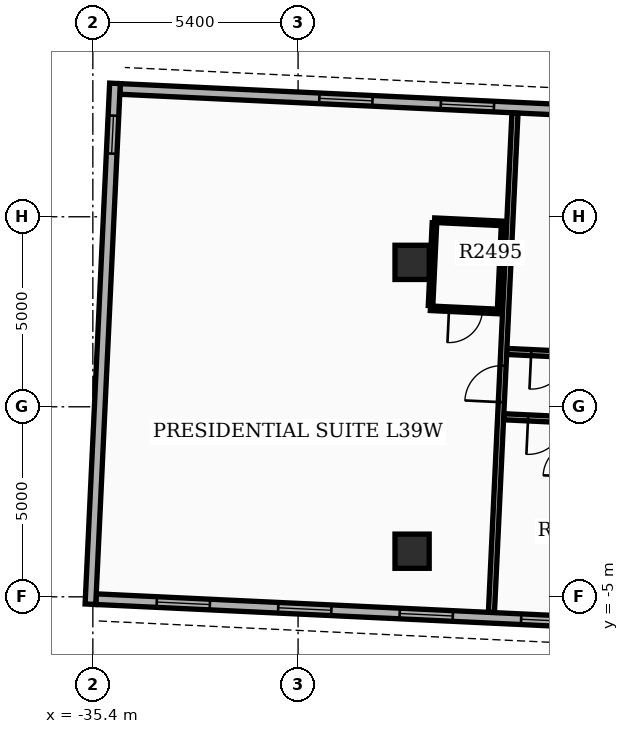
"""IFC4 building model, lengths in metres.
Left out: names, types, materials, properties, quantities, classifications, styles, units other than length and angle.
Written with IfcOpenShell. Run it as: python <this file> out.ifc"""

import sys

from ifc_helpers import new_model, si_unit, direction, frame, frame_2d, origin, origin_2d, place, context, subcontext, project, spatial, rectangle, extrude, element, fill, save


model = new_model("IFC4")
c1 = context("Model", 3, precision=1e-05, world=origin(), true_north=direction((0.0, 1.0)))
c2 = subcontext(c1, "Body", "Model", "MODEL_VIEW")
j1 = project(units=[si_unit("LENGTHUNIT", "METRE"), si_unit("PLANEANGLEUNIT", "RADIAN")], contexts=[c1])
p1 = place(None, origin())
s1 = spatial("IfcSite", under=j1, at=p1, CompositionType="ELEMENT")
p2 = place(p1, origin())
s2 = spatial("IfcBuilding", under=s1, at=p2, CompositionType="ELEMENT")
p3 = place(p2, frame((0.0, 0.0, 156.6)))
s3 = spatial("IfcBuildingStorey", under=s2, at=p3, CompositionType="ELEMENT", Elevation=156.6)
for number, where, z_axis, x_axis in (
    (1, (-27.0, -3.8, 0.0), (0.0, 0.0, 1.0), (1.0, 0.0, 0.0)),
    (2, (-27.0, 3.8, 0.0), (0.0, 0.0, 1.0), (1.0, 0.0, 0.0)),
):
    element("IfcColumn", number, at=place(p3, frame(where, z_axis=z_axis, x_axis=x_axis)), inside=s3, PredefinedType="COLUMN", context=c2, shape_type="SweptSolid", body=[
        extrude(rectangle(XDim=0.9, YDim=0.9, at=origin_2d()), origin(), (0.0, 0.0, 1.0), 3.9),
    ])
p4 = place(p3, frame((-14.607, 7.416, 0.0), z_axis=(0.0, 0.0, 1.0), x_axis=(-0.998890015344, 0.047103473814, 0.0)))
e3 = element("IfcWall", 3, at=p4, inside=s3, PredefinedType="STANDARD", context=c2, shape_type="SweptSolid", body=[
    extrude(rectangle(XDim=20.1, YDim=0.28, at=frame_2d((10.05, 0.0))), origin(), (0.0, 0.0, 1.0), 2.97),
])
p5 = place(p4, frame((1.6, 0.0, 0.8)))
e4 = element("IfcOpeningElement", 4, at=p5, cuts=e3, PredefinedType="OPENING", context=c2, shape_type="SweptSolid", body=[
    extrude(rectangle(XDim=1.4, YDim=1.6, at=frame_2d((0.7, 0.8))), frame((0.0, 0.15, 0.0), z_axis=(0.0, -1.0, 0.0), x_axis=(1.0, 0.0, 0.0)), (0.0, 0.0, 1.0), 0.3),
])
p6 = place(p4, frame((6.55, 0.0, 0.8)))
e5 = element("IfcOpeningElement", 5, at=p6, cuts=e3, PredefinedType="OPENING", context=c2, shape_type="SweptSolid", body=[
    extrude(rectangle(XDim=1.4, YDim=1.6, at=frame_2d((0.7, 0.8))), frame((0.0, 0.15, 0.0), z_axis=(0.0, -1.0, 0.0), x_axis=(1.0, 0.0, 0.0)), (0.0, 0.0, 1.0), 0.3),
])
p7 = place(p4, frame((10.25, 0.0, 0.8)))
e6 = element("IfcOpeningElement", 6, at=p7, cuts=e3, PredefinedType="OPENING", context=c2, shape_type="SweptSolid", body=[
    extrude(rectangle(XDim=1.4, YDim=1.6, at=frame_2d((0.7, 0.8))), frame((0.0, 0.15, 0.0), z_axis=(0.0, -1.0, 0.0), x_axis=(1.0, 0.0, 0.0)), (0.0, 0.0, 1.0), 0.3),
])
p8 = place(p4, frame((13.45, 0.0, 0.8)))
e7 = element("IfcOpeningElement", 7, at=p8, cuts=e3, PredefinedType="OPENING", context=c2, shape_type="SweptSolid", body=[
    extrude(rectangle(XDim=1.4, YDim=1.6, at=frame_2d((0.7, 0.8))), frame((0.0, 0.15, 0.0), z_axis=(0.0, -1.0, 0.0), x_axis=(1.0, 0.0, 0.0)), (0.0, 0.0, 1.0), 0.3),
])
p9 = place(p3, frame((-35.318, -5.062, 0.0), z_axis=(0.0, 0.0, 1.0), x_axis=(0.998890015344, -0.047103473814, 0.0)))
e8 = element("IfcWall", 8, at=p9, inside=s3, PredefinedType="STANDARD", context=c2, shape_type="SweptSolid", body=[
    extrude(rectangle(XDim=20.1, YDim=0.28, at=frame_2d((10.05, 0.0))), origin(), (0.0, 0.0, 1.0), 2.97),
])
p10 = place(p9, frame((1.6, 0.0, 0.8)))
e9 = element("IfcOpeningElement", 9, at=p10, cuts=e8, PredefinedType="OPENING", context=c2, shape_type="SweptSolid", body=[
    extrude(rectangle(XDim=1.4, YDim=1.6, at=frame_2d((0.7, 0.8))), frame((0.0, 0.15, 0.0), z_axis=(0.0, -1.0, 0.0), x_axis=(1.0, 0.0, 0.0)), (0.0, 0.0, 1.0), 0.3),
])
p11 = place(p9, frame((4.8, 0.0, 0.8)))
e10 = element("IfcOpeningElement", 10, at=p11, cuts=e8, PredefinedType="OPENING", context=c2, shape_type="SweptSolid", body=[
    extrude(rectangle(XDim=1.4, YDim=1.6, at=frame_2d((0.7, 0.8))), frame((0.0, 0.15, 0.0), z_axis=(0.0, -1.0, 0.0), x_axis=(1.0, 0.0, 0.0)), (0.0, 0.0, 1.0), 0.3),
])
p12 = place(p9, frame((8.0, 0.0, 0.8)))
e11 = element("IfcOpeningElement", 11, at=p12, cuts=e8, PredefinedType="OPENING", context=c2, shape_type="SweptSolid", body=[
    extrude(rectangle(XDim=1.4, YDim=1.6, at=frame_2d((0.7, 0.8))), frame((0.0, 0.15, 0.0), z_axis=(0.0, -1.0, 0.0), x_axis=(1.0, 0.0, 0.0)), (0.0, 0.0, 1.0), 0.3),
])
p13 = place(p9, frame((11.2, 0.0, 0.8)))
e12 = element("IfcOpeningElement", 12, at=p13, cuts=e8, PredefinedType="OPENING", context=c2, shape_type="SweptSolid", body=[
    extrude(rectangle(XDim=1.4, YDim=1.6, at=frame_2d((0.7, 0.8))), frame((0.0, 0.15, 0.0), z_axis=(0.0, -1.0, 0.0), x_axis=(1.0, 0.0, 0.0)), (0.0, 0.0, 1.0), 0.3),
])
p14 = place(p9, frame((15.75, 0.0, 0.0)))
e13 = element("IfcOpeningElement", 13, at=p14, cuts=e8, PredefinedType="OPENING", context=c2, shape_type="SweptSolid", body=[
    extrude(rectangle(XDim=0.96, YDim=2.1, at=frame_2d((0.48, 1.05))), frame((0.0, 0.15, 0.0), z_axis=(0.0, -1.0, 0.0), x_axis=(1.0, 0.0, 0.0)), (0.0, 0.0, 1.0), 0.3),
])
p15 = place(p3, frame((-34.818, 8.51, 0.0), z_axis=(0.0, 0.0, 1.0), x_axis=(-0.047101845086, -0.998890092147, 0.0)))
e14 = element("IfcWall", 14, at=p15, inside=s3, PredefinedType="STANDARD", context=c2, shape_type="SweptSolid", body=[
    extrude(rectangle(XDim=13.72, YDim=0.28, at=frame_2d((6.86, 0.0))), origin(), (0.0, 0.0, 1.0), 2.97),
])
p16 = place(p15, frame((0.85, 0.0, 0.85)))
e15 = element("IfcOpeningElement", 15, at=p16, cuts=e14, PredefinedType="OPENING", context=c2, shape_type="SweptSolid", body=[
    extrude(rectangle(XDim=1.0, YDim=1.5, at=frame_2d((0.5, 0.75))), frame((0.0, 0.15, 0.0), z_axis=(0.0, -1.0, 0.0), x_axis=(1.0, 0.0, 0.0)), (0.0, 0.0, 1.0), 0.3),
])
p17 = place(p3, frame((-14.819, 0.999, 0.0), z_axis=(0.0, 0.0, 1.0), x_axis=(-0.998890575268, 0.047091598416, 0.0)))
e16 = element("IfcWall", 16, at=p17, inside=s3, PredefinedType="PARTITIONING", context=c2, shape_type="SweptSolid", body=[
    extrude(rectangle(XDim=9.7, YDim=0.16, at=frame_2d((4.85, 0.0))), origin(), (0.0, 0.0, 1.0), 2.96),
])
p18 = place(p17, frame((2.575, 0.0, 0.0)))
e17 = element("IfcOpeningElement", 17, at=p18, cuts=e16, PredefinedType="OPENING", context=c2, shape_type="SweptSolid", body=[
    extrude(rectangle(XDim=0.96, YDim=2.15, at=frame_2d((0.48, 1.075))), frame((0.0, 0.09, 0.0), z_axis=(0.0, -1.0, 0.0), x_axis=(1.0, 0.0, 0.0)), (0.0, 0.0, 1.0), 0.18),
])
p19 = place(p17, frame((8.097, 0.0, 0.0)))
e18 = element("IfcOpeningElement", 18, at=p19, cuts=e16, PredefinedType="OPENING", context=c2, shape_type="SweptSolid", body=[
    extrude(rectangle(XDim=0.96, YDim=2.15, at=frame_2d((0.48, 1.075))), frame((0.0, 0.09, 0.0), z_axis=(0.0, -1.0, 0.0), x_axis=(1.0, 0.0, 0.0)), (0.0, 0.0, 1.0), 0.18),
])
p20 = place(p3, frame((-14.9, -0.719, 0.0), z_axis=(0.0, 0.0, 1.0), x_axis=(-0.99888939101, 0.047116711769, 0.0)))
e19 = element("IfcWall", 19, at=p20, inside=s3, PredefinedType="PARTITIONING", context=c2, shape_type="SweptSolid", body=[
    extrude(rectangle(XDim=9.7, YDim=0.16, at=frame_2d((4.85, 0.0))), origin(), (0.0, 0.0, 1.0), 2.96),
])
p21 = place(p20, frame((2.575, 0.0, 0.0)))
e20 = element("IfcOpeningElement", 20, at=p21, cuts=e19, PredefinedType="OPENING", context=c2, shape_type="SweptSolid", body=[
    extrude(rectangle(XDim=0.96, YDim=2.15, at=frame_2d((0.48, 1.075))), frame((0.0, 0.09, 0.0), z_axis=(0.0, -1.0, 0.0), x_axis=(1.0, 0.0, 0.0)), (0.0, 0.0, 1.0), 0.18),
])
p22 = place(p20, frame((8.097, 0.0, 0.0)))
e21 = element("IfcOpeningElement", 21, at=p22, cuts=e19, PredefinedType="OPENING", context=c2, shape_type="SweptSolid", body=[
    extrude(rectangle(XDim=0.96, YDim=2.15, at=frame_2d((0.48, 1.075))), frame((0.0, 0.09, 0.0), z_axis=(0.0, -1.0, 0.0), x_axis=(1.0, 0.0, 0.0)), (0.0, 0.0, 1.0), 0.18),
])
p23 = place(p3, frame((-24.912, -5.405, 0.0), z_axis=(0.0, 0.0, 1.0), x_axis=(0.047104484326, 0.998889967692, 0.0)))
e22 = element("IfcWall", 22, at=p23, inside=s3, PredefinedType="PARTITIONING", context=c2, shape_type="SweptSolid", body=[
    extrude(rectangle(XDim=13.144, YDim=0.16, at=frame_2d((6.572, 0.0))), origin(), (0.0, 0.0, 1.0), 2.96),
])
p24 = place(p23, frame((5.532, 0.0, 0.0)))
e23 = element("IfcOpeningElement", 23, at=p24, cuts=e22, PredefinedType="OPENING", context=c2, shape_type="SweptSolid", body=[
    extrude(rectangle(XDim=0.96, YDim=2.15, at=frame_2d((0.48, 1.075))), frame((0.0, 0.09, 0.0), z_axis=(0.0, -1.0, 0.0), x_axis=(1.0, 0.0, 0.0)), (0.0, 0.0, 1.0), 0.18),
])
for number, where, z_axis, x_axis in (
    (24, (-24.696, 2.576, 0.0), (0.0, 0.0, 1.0), (0.047, 0.999, 0.0)),
    (25, (-26.514, 2.662, 0.0), (0.0, 0.0, 1.0), (0.047, 0.999, 0.0)),
):
    element("IfcWall", number, at=place(p3, frame(where, z_axis=z_axis, x_axis=x_axis)), inside=s3, PredefinedType="PARTITIONING", context=c2, shape_type="SweptSolid", body=[
        extrude(rectangle(XDim=2.18, YDim=0.12, at=frame_2d((1.09, 0.0))), origin(), (0.0, 0.0, 1.0), 2.96),
    ])
p25 = place(p3, frame((-24.699, 2.506, 0.0), z_axis=(0.0, 0.0, 1.0), x_axis=(-0.998890786574, 0.047087116047, 0.0)))
e26 = element("IfcWall", 26, at=p25, inside=s3, PredefinedType="PARTITIONING", context=c2, shape_type="SweptSolid", body=[
    extrude(rectangle(XDim=1.82, YDim=0.12, at=frame_2d((0.91, 0.0))), origin(), (0.0, 0.0, 1.0), 2.96),
])
p26 = place(p25, frame((0.45, 0.0, 0.0)))
e27 = element("IfcOpeningElement", 27, at=p26, cuts=e26, PredefinedType="OPENING", context=c2, shape_type="SweptSolid", body=[
    extrude(rectangle(XDim=0.88, YDim=2.1, at=frame_2d((0.44, 1.05))), frame((0.0, 0.07, 0.0), z_axis=(0.0, -1.0, 0.0), x_axis=(1.0, 0.0, 0.0)), (0.0, 0.0, 1.0), 0.14),
])
p27 = place(p3, frame((-24.59, 4.824, 0.0), z_axis=(0.0, 0.0, 1.0), x_axis=(-0.998890786574, 0.047087116047, 0.0)))
e28 = element("IfcWall", 28, at=p27, inside=s3, PredefinedType="PARTITIONING", context=c2, shape_type="SweptSolid", body=[
    extrude(rectangle(XDim=1.82, YDim=0.12, at=frame_2d((0.91, 0.0))), origin(), (0.0, 0.0, 1.0), 2.96),
])
p28 = place(p7, origin())
e29 = element("IfcWindow", 29, at=p28, inside=s3, PartitioningType="SINGLE_PANEL", PredefinedType="WINDOW", context=c2, shape_type="SweptSolid", body=[
    extrude(rectangle(XDim=1.4, YDim=1.6, at=frame_2d((0.7, 0.8))), frame((0.0, 0.03, 0.0), z_axis=(0.0, -1.0, 0.0), x_axis=(1.0, 0.0, 0.0)), (0.0, 0.0, 1.0), 0.06),
])
fill(e6, e29)
p29 = place(p8, origin())
e30 = element("IfcWindow", 30, at=p29, inside=s3, PartitioningType="SINGLE_PANEL", PredefinedType="WINDOW", context=c2, shape_type="SweptSolid", body=[
    extrude(rectangle(XDim=1.4, YDim=1.6, at=frame_2d((0.7, 0.8))), frame((0.0, 0.03, 0.0), z_axis=(0.0, -1.0, 0.0), x_axis=(1.0, 0.0, 0.0)), (0.0, 0.0, 1.0), 0.06),
])
fill(e7, e30)
p30 = place(p10, origin())
e31 = element("IfcWindow", 31, at=p30, inside=s3, PartitioningType="SINGLE_PANEL", PredefinedType="WINDOW", context=c2, shape_type="SweptSolid", body=[
    extrude(rectangle(XDim=1.4, YDim=1.6, at=frame_2d((0.7, 0.8))), frame((0.0, 0.03, 0.0), z_axis=(0.0, -1.0, 0.0), x_axis=(1.0, 0.0, 0.0)), (0.0, 0.0, 1.0), 0.06),
])
fill(e9, e31)
p31 = place(p11, origin())
e32 = element("IfcWindow", 32, at=p31, inside=s3, PartitioningType="SINGLE_PANEL", PredefinedType="WINDOW", context=c2, shape_type="SweptSolid", body=[
    extrude(rectangle(XDim=1.4, YDim=1.6, at=frame_2d((0.7, 0.8))), frame((0.0, 0.03, 0.0), z_axis=(0.0, -1.0, 0.0), x_axis=(1.0, 0.0, 0.0)), (0.0, 0.0, 1.0), 0.06),
])
fill(e10, e32)
p32 = place(p12, origin())
e33 = element("IfcWindow", 33, at=p32, inside=s3, PartitioningType="SINGLE_PANEL", PredefinedType="WINDOW", context=c2, shape_type="SweptSolid", body=[
    extrude(rectangle(XDim=1.4, YDim=1.6, at=frame_2d((0.7, 0.8))), frame((0.0, 0.03, 0.0), z_axis=(0.0, -1.0, 0.0), x_axis=(1.0, 0.0, 0.0)), (0.0, 0.0, 1.0), 0.06),
])
fill(e11, e33)
p33 = place(p13, origin())
e34 = element("IfcWindow", 34, at=p33, inside=s3, PartitioningType="SINGLE_PANEL", PredefinedType="WINDOW", context=c2, shape_type="SweptSolid", body=[
    extrude(rectangle(XDim=1.4, YDim=1.6, at=frame_2d((0.7, 0.8))), frame((0.0, 0.03, 0.0), z_axis=(0.0, -1.0, 0.0), x_axis=(1.0, 0.0, 0.0)), (0.0, 0.0, 1.0), 0.06),
])
fill(e12, e34)
p34 = place(p16, origin())
e35 = element("IfcWindow", 35, at=p34, inside=s3, PartitioningType="SINGLE_PANEL", PredefinedType="WINDOW", context=c2, shape_type="SweptSolid", body=[
    extrude(rectangle(XDim=1.0, YDim=1.5, at=frame_2d((0.5, 0.75))), frame((0.0, 0.03, 0.0), z_axis=(0.0, -1.0, 0.0), x_axis=(1.0, 0.0, 0.0)), (0.0, 0.0, 1.0), 0.06),
])
fill(e15, e35)
p35 = place(p19, origin())
e36 = element("IfcDoor", 36, at=p35, inside=s3, OperationType="SINGLE_SWING_RIGHT", PredefinedType="DOOR", context=c2, shape_type="SweptSolid", body=[
    extrude(rectangle(XDim=0.96, YDim=2.15, at=frame_2d((0.48, 1.075))), frame((0.0, 0.025, 0.0), z_axis=(0.0, -1.0, 0.0), x_axis=(1.0, 0.0, 0.0)), (0.0, 0.0, 1.0), 0.05),
])
fill(e18, e36)
p36 = place(p22, origin())
e37 = element("IfcDoor", 37, at=p36, inside=s3, OperationType="SINGLE_SWING_RIGHT", PredefinedType="DOOR", context=c2, shape_type="SweptSolid", body=[
    extrude(rectangle(XDim=0.96, YDim=2.15, at=frame_2d((0.48, 1.075))), frame((0.0, 0.025, 0.0), z_axis=(0.0, -1.0, 0.0), x_axis=(1.0, 0.0, 0.0)), (0.0, 0.0, 1.0), 0.05),
])
fill(e21, e37)
p37 = place(p24, origin())
e38 = element("IfcDoor", 38, at=p37, inside=s3, OperationType="SINGLE_SWING_LEFT", PredefinedType="DOOR", context=c2, shape_type="SweptSolid", body=[
    extrude(rectangle(XDim=0.96, YDim=2.15, at=frame_2d((0.48, 1.075))), frame((0.0, 0.025, 0.0), z_axis=(0.0, -1.0, 0.0), x_axis=(1.0, 0.0, 0.0)), (0.0, 0.0, 1.0), 0.05),
])
fill(e23, e38)
p38 = place(p26, origin())
e39 = element("IfcDoor", 39, at=p38, inside=s3, OperationType="SINGLE_SWING_RIGHT", PredefinedType="DOOR", context=c2, shape_type="SweptSolid", body=[
    extrude(rectangle(XDim=0.88, YDim=2.1, at=frame_2d((0.44, 1.05))), frame((0.0, 0.025, 0.0), z_axis=(0.0, -1.0, 0.0), x_axis=(1.0, 0.0, 0.0)), (0.0, 0.0, 1.0), 0.05),
])
fill(e27, e39)
save(model, sys.argv[1])
